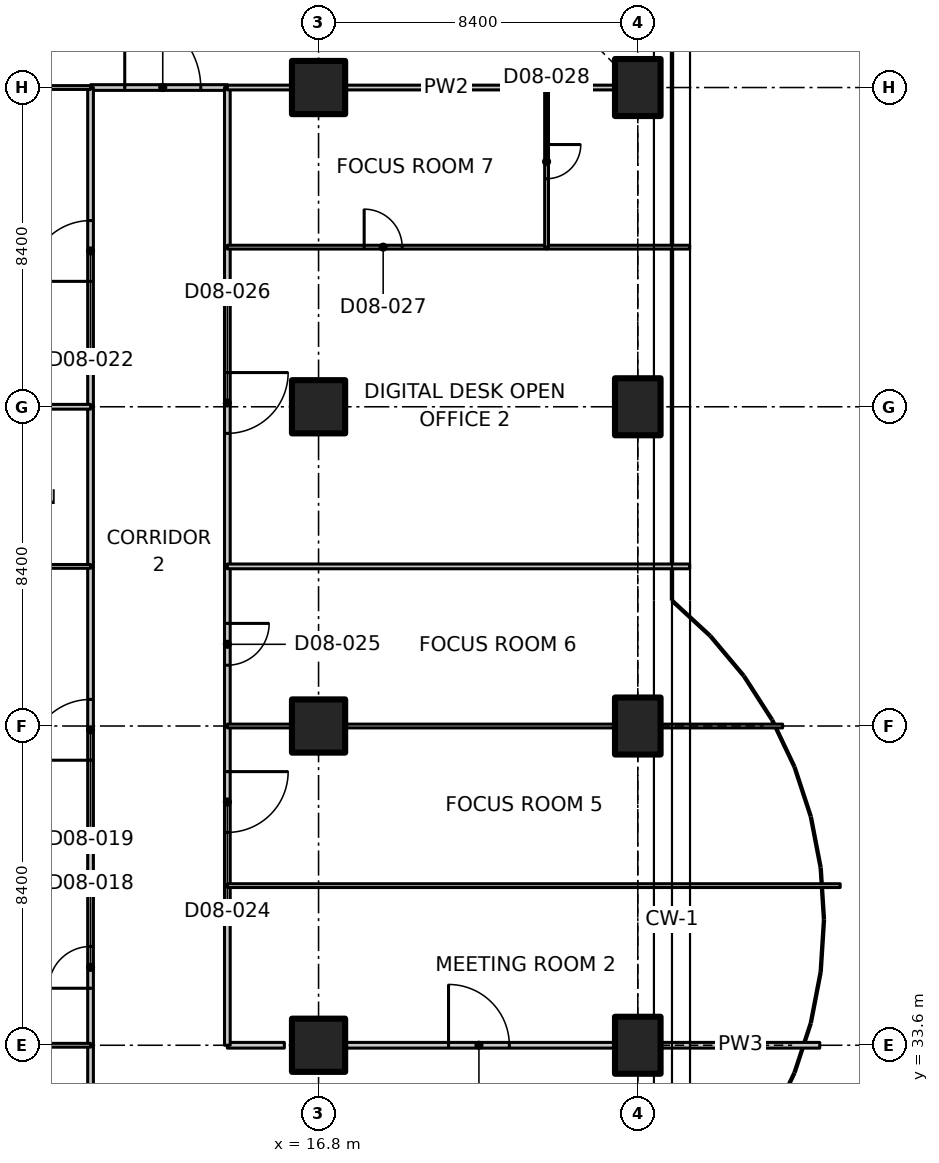
"""IFC4 building model, lengths in metres.
Left out: names, types, materials, properties, quantities, classifications, styles, units other than length and angle.
Written with IfcOpenShell. Run it as: python <this file> out.ifc"""

import sys

from ifc_helpers import new_model, si_unit, direction, frame, frame_2d, origin, origin_2d, place, context, subcontext, project, spatial, polyline, rectangle, outline, extrude, element, fill, save


model = new_model("IFC4")
c1 = context("Model", 3, precision=1e-05, world=origin(), true_north=direction((0.0, 1.0)))
c2 = subcontext(c1, "Body", "Model", "MODEL_VIEW")
j1 = project(units=[si_unit("LENGTHUNIT", "METRE"), si_unit("PLANEANGLEUNIT", "RADIAN")], contexts=[c1])
p1 = place(None, origin())
s1 = spatial("IfcSite", under=j1, at=p1, CompositionType="ELEMENT")
p2 = place(p1, origin())
s2 = spatial("IfcBuilding", under=s1, at=p2, CompositionType="ELEMENT")
p3 = place(p2, frame((0.0, 0.0, 47.3)))
s3 = spatial("IfcBuildingStorey", under=s2, at=p3, CompositionType="ELEMENT", Elevation=47.3)
for number, where, z_axis, x_axis in (
    (1, (16.8, 33.6, 0.0), (0.0, 0.0, 1.0), (1.0, 0.0, 0.0)),
    (2, (16.8, 42.0, 0.0), (0.0, 0.0, 1.0), (1.0, 0.0, 0.0)),
    (3, (16.8, 50.4, 0.0), (0.0, 0.0, 1.0), (1.0, 0.0, 0.0)),
    (4, (16.8, 58.8, 0.0), (0.0, 0.0, 1.0), (1.0, 0.0, 0.0)),
):
    element("IfcColumn", number, at=place(p3, frame(where, z_axis=z_axis, x_axis=x_axis)), inside=s3, PredefinedType="COLUMN", context=c2, shape_type="SweptSolid", body=[
        extrude(rectangle(XDim=1.4, YDim=1.4, at=origin_2d()), origin(), (0.0, 0.0, 1.0), 3.35),
    ])
for number, where, z_axis, x_axis in (
    (5, (25.2, 33.6, 0.0), (0.0, 0.0, 1.0), (1.0, 0.0, 0.0)),
    (6, (25.2, 42.0, 0.0), (0.0, 0.0, 1.0), (1.0, 0.0, 0.0)),
    (7, (25.2, 50.4, 0.0), (0.0, 0.0, 1.0), (1.0, 0.0, 0.0)),
    (8, (25.2, 58.8, 0.0), (0.0, 0.0, 1.0), (1.0, 0.0, 0.0)),
):
    element("IfcColumn", number, at=place(p3, frame(where, z_axis=z_axis, x_axis=x_axis)), inside=s3, PredefinedType="COLUMN", context=c2, shape_type="SweptSolid", body=[
        extrude(rectangle(XDim=1.2, YDim=1.5, at=origin_2d()), origin(), (0.0, 0.0, 1.0), 3.35),
    ])
p4 = place(p3, frame((10.8, 29.4, 0.0), z_axis=(0.0, 0.0, 1.0), x_axis=(0.0, 1.0, 0.0)))
e9 = element("IfcWall", 9, at=p4, inside=s3, PredefinedType="PARTITIONING", context=c2, shape_type="SweptSolid", body=[
    extrude(rectangle(XDim=4.2, YDim=0.15, at=frame_2d((2.1, 0.0))), origin(), (0.0, 0.0, 1.0), 3.33),
])
p5 = place(p4, frame((1.5, 0.0, 0.0)))
e10 = element("IfcOpeningElement", 10, at=p5, cuts=e9, PredefinedType="OPENING", context=c2, shape_type="SweptSolid", body=[
    extrude(rectangle(XDim=1.1, YDim=2.1, at=frame_2d((0.55, 1.05))), frame((0.0, 0.085, 0.0), z_axis=(0.0, -1.0, 0.0), x_axis=(1.0, 0.0, 0.0)), (0.0, 0.0, 1.0), 0.17),
])
p6 = place(p3, frame((14.4, 33.6, 0.0), z_axis=(0.0, 0.0, 1.0), x_axis=(1.0, 0.0, 0.0)))
e11 = element("IfcWall", 11, at=p6, inside=s3, PredefinedType="PARTITIONING", context=c2, shape_type="SweptSolid", body=[
    extrude(rectangle(XDim=1.5, YDim=0.15, at=frame_2d((0.75, 0.0))), origin(), (0.0, 0.0, 1.0), 3.33),
])
p7 = place(p3, frame((17.52, 33.6, 0.0), z_axis=(0.0, 0.0, 1.0), x_axis=(1.0, 0.0, 0.0)))
e12 = element("IfcWall", 12, at=p7, inside=s3, PredefinedType="PARTITIONING", context=c2, shape_type="SweptSolid", body=[
    extrude(rectangle(XDim=7.06, YDim=0.15, at=frame_2d((3.53, 0.0))), origin(), (0.0, 0.0, 1.0), 3.33),
])
p8 = place(p7, frame((2.7, 0.0, 0.0)))
e13 = element("IfcOpeningElement", 13, at=p8, cuts=e12, PredefinedType="OPENING", context=c2, shape_type="SweptSolid", body=[
    extrude(rectangle(XDim=1.6, YDim=2.1, at=frame_2d((0.8, 1.05))), frame((0.0, 0.085, 0.0), z_axis=(0.0, -1.0, 0.0), x_axis=(1.0, 0.0, 0.0)), (0.0, 0.0, 1.0), 0.17),
])
p9 = place(p3, frame((25.82, 33.6, 0.0), z_axis=(0.0, 0.0, 1.0), x_axis=(1.0, 0.0, 0.0)))
e14 = element("IfcWall", 14, at=p9, inside=s3, PredefinedType="PARTITIONING", context=c2, shape_type="SweptSolid", body=[
    extrude(rectangle(XDim=4.168, YDim=0.15, at=frame_2d((2.084, 0.0))), origin(), (0.0, 0.0, 1.0), 2.98),
])
p10 = place(p3, frame((10.8, 58.8, 0.0), z_axis=(0.0, 0.0, 1.0), x_axis=(1.0, 0.0, 0.0)))
e15 = element("IfcWall", 15, at=p10, inside=s3, PredefinedType="PARTITIONING", context=c2, shape_type="SweptSolid", body=[
    extrude(rectangle(XDim=3.6, YDim=0.15, at=frame_2d((1.8, 0.0))), origin(), (0.0, 0.0, 1.0), 3.33),
])
p11 = place(p10, frame((0.9, 0.0, 0.0)))
e16 = element("IfcOpeningElement", 16, at=p11, cuts=e15, PredefinedType="OPENING", context=c2, shape_type="SweptSolid", body=[
    extrude(rectangle(XDim=2.0, YDim=2.4, at=frame_2d((1.0, 1.2))), frame((0.0, 0.085, 0.0), z_axis=(0.0, -1.0, 0.0), x_axis=(1.0, 0.0, 0.0)), (0.0, 0.0, 1.0), 0.17),
])
p12 = place(p3, frame((10.8, 33.6, 0.0), z_axis=(0.0, 0.0, 1.0), x_axis=(0.0, 1.0, 0.0)))
e17 = element("IfcWall", 17, at=p12, inside=s3, PredefinedType="PARTITIONING", context=c2, shape_type="SweptSolid", body=[
    extrude(rectangle(XDim=4.2, YDim=0.15, at=frame_2d((2.1, 0.0))), origin(), (0.0, 0.0, 1.0), 3.33),
])
p13 = place(p12, frame((1.5, 0.0, 0.0)))
e18 = element("IfcOpeningElement", 18, at=p13, cuts=e17, PredefinedType="OPENING", context=c2, shape_type="SweptSolid", body=[
    extrude(rectangle(XDim=1.1, YDim=2.1, at=frame_2d((0.55, 1.05))), frame((0.0, 0.085, 0.0), z_axis=(0.0, -1.0, 0.0), x_axis=(1.0, 0.0, 0.0)), (0.0, 0.0, 1.0), 0.17),
])
p14 = place(p3, frame((10.8, 37.8, 0.0), z_axis=(0.0, 0.0, 1.0), x_axis=(0.0, 1.0, 0.0)))
e19 = element("IfcWall", 19, at=p14, inside=s3, PredefinedType="PARTITIONING", context=c2, shape_type="SweptSolid", body=[
    extrude(rectangle(XDim=8.4, YDim=0.15, at=frame_2d((4.2, 0.0))), origin(), (0.0, 0.0, 1.0), 3.33),
])
p15 = place(p14, frame((3.3, 0.0, 0.0)))
e20 = element("IfcOpeningElement", 20, at=p15, cuts=e19, PredefinedType="OPENING", context=c2, shape_type="SweptSolid", body=[
    extrude(rectangle(XDim=1.6, YDim=2.1, at=frame_2d((0.8, 1.05))), frame((0.0, 0.085, 0.0), z_axis=(0.0, -1.0, 0.0), x_axis=(1.0, 0.0, 0.0)), (0.0, 0.0, 1.0), 0.17),
])
p16 = place(p3, frame((10.8, 46.2, 0.0), z_axis=(0.0, 0.0, 1.0), x_axis=(0.0, 1.0, 0.0)))
e21 = element("IfcWall", 21, at=p16, inside=s3, PredefinedType="PARTITIONING", context=c2, shape_type="SweptSolid", body=[
    extrude(rectangle(XDim=4.2, YDim=0.15, at=frame_2d((2.1, 0.0))), origin(), (0.0, 0.0, 1.0), 3.33),
])
p17 = place(p3, frame((10.8, 50.4, 0.0), z_axis=(0.0, 0.0, 1.0), x_axis=(0.0, 1.0, 0.0)))
e22 = element("IfcWall", 22, at=p17, inside=s3, PredefinedType="PARTITIONING", context=c2, shape_type="SweptSolid", body=[
    extrude(rectangle(XDim=8.4, YDim=0.15, at=frame_2d((4.2, 0.0))), origin(), (0.0, 0.0, 1.0), 3.33),
])
p18 = place(p17, frame((3.3, 0.0, 0.0)))
e23 = element("IfcOpeningElement", 23, at=p18, cuts=e22, PredefinedType="OPENING", context=c2, shape_type="SweptSolid", body=[
    extrude(rectangle(XDim=1.6, YDim=2.1, at=frame_2d((0.8, 1.05))), frame((0.0, 0.085, 0.0), z_axis=(0.0, -1.0, 0.0), x_axis=(1.0, 0.0, 0.0)), (0.0, 0.0, 1.0), 0.17),
])
p19 = place(p3, frame((14.4, 37.8, 0.0), z_axis=(0.0, 0.0, 1.0), x_axis=(0.0, -1.0, 0.0)))
e24 = element("IfcWall", 24, at=p19, inside=s3, PredefinedType="PARTITIONING", context=c2, shape_type="SweptSolid", body=[
    extrude(rectangle(XDim=4.2, YDim=0.15, at=frame_2d((2.1, 0.0))), origin(), (0.0, 0.0, 1.0), 3.33),
])
p20 = place(p3, frame((14.4, 42.0, 0.0), z_axis=(0.0, 0.0, 1.0), x_axis=(0.0, -1.0, 0.0)))
e25 = element("IfcWall", 25, at=p20, inside=s3, PredefinedType="PARTITIONING", context=c2, shape_type="SweptSolid", body=[
    extrude(rectangle(XDim=4.2, YDim=0.15, at=frame_2d((2.1, 0.0))), origin(), (0.0, 0.0, 1.0), 3.33),
])
p21 = place(p20, frame((1.2, 0.0, 0.0)))
e26 = element("IfcOpeningElement", 26, at=p21, cuts=e25, PredefinedType="OPENING", context=c2, shape_type="SweptSolid", body=[
    extrude(rectangle(XDim=1.6, YDim=2.1, at=frame_2d((0.8, 1.05))), frame((0.0, 0.085, 0.0), z_axis=(0.0, -1.0, 0.0), x_axis=(1.0, 0.0, 0.0)), (0.0, 0.0, 1.0), 0.17),
])
p22 = place(p3, frame((14.4, 46.2, 0.0), z_axis=(0.0, 0.0, 1.0), x_axis=(0.0, -1.0, 0.0)))
e27 = element("IfcWall", 27, at=p22, inside=s3, PredefinedType="PARTITIONING", context=c2, shape_type="SweptSolid", body=[
    extrude(rectangle(XDim=4.2, YDim=0.15, at=frame_2d((2.1, 0.0))), origin(), (0.0, 0.0, 1.0), 3.33),
])
p23 = place(p22, frame((1.5, 0.0, 0.0)))
e28 = element("IfcOpeningElement", 28, at=p23, cuts=e27, PredefinedType="OPENING", context=c2, shape_type="SweptSolid", body=[
    extrude(rectangle(XDim=1.1, YDim=2.1, at=frame_2d((0.55, 1.05))), frame((0.0, 0.085, 0.0), z_axis=(0.0, -1.0, 0.0), x_axis=(1.0, 0.0, 0.0)), (0.0, 0.0, 1.0), 0.17),
])
p24 = place(p3, frame((14.4, 54.6, 0.0), z_axis=(0.0, 0.0, 1.0), x_axis=(0.0, -1.0, 0.0)))
e29 = element("IfcWall", 29, at=p24, inside=s3, PredefinedType="PARTITIONING", context=c2, shape_type="SweptSolid", body=[
    extrude(rectangle(XDim=8.4, YDim=0.15, at=frame_2d((4.2, 0.0))), origin(), (0.0, 0.0, 1.0), 3.33),
])
p25 = place(p24, frame((3.3, 0.0, 0.0)))
e30 = element("IfcOpeningElement", 30, at=p25, cuts=e29, PredefinedType="OPENING", context=c2, shape_type="SweptSolid", body=[
    extrude(rectangle(XDim=1.6, YDim=2.1, at=frame_2d((0.8, 1.05))), frame((0.0, 0.085, 0.0), z_axis=(0.0, -1.0, 0.0), x_axis=(1.0, 0.0, 0.0)), (0.0, 0.0, 1.0), 0.17),
])
p26 = place(p3, frame((14.4, 58.8, 0.0), z_axis=(0.0, 0.0, 1.0), x_axis=(0.0, -1.0, 0.0)))
e31 = element("IfcWall", 31, at=p26, inside=s3, PredefinedType="PARTITIONING", context=c2, shape_type="SweptSolid", body=[
    extrude(rectangle(XDim=4.2, YDim=0.15, at=frame_2d((2.1, 0.0))), origin(), (0.0, 0.0, 1.0), 3.33),
])
p27 = place(p3, frame((10.8, 58.8, 0.0), z_axis=(0.0, 0.0, 1.0), x_axis=(-1.0, 0.0, 0.0)))
e32 = element("IfcWall", 32, at=p27, inside=s3, PredefinedType="PARTITIONING", context=c2, shape_type="SweptSolid", body=[
    extrude(rectangle(XDim=1.68, YDim=0.1, at=frame_2d((0.84, 0.0))), origin(), (0.0, 0.0, 1.0), 3.33),
])
p28 = place(p3, frame((22.8, 58.8, 0.0), z_axis=(0.0, 0.0, 1.0), x_axis=(-1.0, 0.0, 0.0)))
e33 = element("IfcWall", 33, at=p28, inside=s3, PredefinedType="PARTITIONING", context=c2, shape_type="SweptSolid", body=[
    extrude(rectangle(XDim=5.28, YDim=0.125, at=frame_2d((2.64, 0.0))), origin(), (0.0, 0.0, 1.0), 3.33),
])
p29 = place(p3, frame((16.08, 58.8, 0.0), z_axis=(0.0, 0.0, 1.0), x_axis=(-1.0, 0.0, 0.0)))
e34 = element("IfcWall", 34, at=p29, inside=s3, PredefinedType="PARTITIONING", context=c2, shape_type="SweptSolid", body=[
    extrude(rectangle(XDim=1.68, YDim=0.125, at=frame_2d((0.84, 0.0))), origin(), (0.0, 0.0, 1.0), 3.33),
])
p30 = place(p3, frame((24.58, 58.8, 0.0), z_axis=(0.0, 0.0, 1.0), x_axis=(-1.0, 0.0, 0.0)))
e35 = element("IfcWall", 35, at=p30, inside=s3, PredefinedType="PARTITIONING", context=c2, shape_type="SweptSolid", body=[
    extrude(rectangle(XDim=1.78, YDim=0.125, at=frame_2d((0.89, 0.0))), origin(), (0.0, 0.0, 1.0), 3.33),
])
p31 = place(p3, frame((9.12, 33.6, 0.0), z_axis=(0.0, 0.0, 1.0), x_axis=(1.0, 0.0, 0.0)))
e36 = element("IfcWall", 36, at=p31, inside=s3, PredefinedType="PARTITIONING", context=c2, shape_type="SweptSolid", body=[
    extrude(rectangle(XDim=1.68, YDim=0.1, at=frame_2d((0.84, 0.0))), origin(), (0.0, 0.0, 1.0), 3.33),
])
p32 = place(p3, frame((-1.365, 37.8, 0.0), z_axis=(0.0, 0.0, 1.0), x_axis=(1.0, 0.0, 0.0)))
e37 = element("IfcWall", 37, at=p32, inside=s3, PredefinedType="PARTITIONING", context=c2, shape_type="SweptSolid", body=[
    extrude(outline(polyline([(0.0, 0.0), (12.165, 0.0), (12.165, 3.33), (1.815, 3.33), (1.813, 2.98), (0.917, 2.98), (0.915, 3.33), (0.265, 3.33), (0.0, 3.33), (0.0, 0.0)])), frame((0.0, 0.062, 0.0), z_axis=(0.0, -1.0, 0.0), x_axis=(1.0, 0.0, 0.0)), (0.0, 0.0, 1.0), 0.125),
])
p33 = place(p3, frame((6.0, 46.2, 0.0), z_axis=(0.0, 0.0, 1.0), x_axis=(1.0, 0.0, 0.0)))
e38 = element("IfcWall", 38, at=p33, inside=s3, PredefinedType="PARTITIONING", context=c2, shape_type="SweptSolid", body=[
    extrude(rectangle(XDim=4.8, YDim=0.1, at=frame_2d((2.4, 0.0))), origin(), (0.0, 0.0, 1.0), 3.33),
])
p34 = place(p33, frame((1.8, 0.0, 0.0)))
e39 = element("IfcOpeningElement", 39, at=p34, cuts=e38, PredefinedType="OPENING", context=c2, shape_type="SweptSolid", body=[
    extrude(rectangle(XDim=1.0, YDim=2.1, at=frame_2d((0.5, 1.05))), frame((0.0, 0.06, 0.0), z_axis=(0.0, -1.0, 0.0), x_axis=(1.0, 0.0, 0.0)), (0.0, 0.0, 1.0), 0.12),
])
p35 = place(p3, frame((9.12, 50.4, 0.0), z_axis=(0.0, 0.0, 1.0), x_axis=(1.0, 0.0, 0.0)))
e40 = element("IfcWall", 40, at=p35, inside=s3, PredefinedType="PARTITIONING", context=c2, shape_type="SweptSolid", body=[
    extrude(rectangle(XDim=1.68, YDim=0.125, at=frame_2d((0.84, 0.0))), origin(), (0.0, 0.0, 1.0), 3.33),
])
p36 = place(p3, frame((14.4, 37.8, 0.0), z_axis=(0.0, 0.0, 1.0), x_axis=(1.0, 0.0, 0.0)))
e41 = element("IfcWall", 41, at=p36, inside=s3, PredefinedType="PARTITIONING", context=c2, shape_type="SweptSolid", body=[
    extrude(outline(polyline([(0.0, 0.0), (16.126, 0.0), (16.126, 3.33), (15.843, 3.33), (11.25, 3.33), (11.248, 2.98), (10.352, 2.98), (10.35, 3.33), (0.0, 3.33), (0.0, 0.0)])), frame((0.0, 0.05, 0.0), z_axis=(0.0, -1.0, 0.0), x_axis=(1.0, 0.0, 0.0)), (0.0, 0.0, 1.0), 0.1),
])
p37 = place(p3, frame((14.4, 42.0, 0.0), z_axis=(0.0, 0.0, 1.0), x_axis=(1.0, 0.0, 0.0)))
e42 = element("IfcWall", 42, at=p37, inside=s3, PredefinedType="PARTITIONING", context=c2, shape_type="SweptSolid", body=[
    extrude(rectangle(XDim=1.68, YDim=0.1, at=frame_2d((0.84, 0.0))), origin(), (0.0, 0.0, 1.0), 3.33),
])
p38 = place(p3, frame((17.52, 42.0, 0.0), z_axis=(0.0, 0.0, 1.0), x_axis=(1.0, 0.0, 0.0)))
e43 = element("IfcWall", 43, at=p38, inside=s3, PredefinedType="PARTITIONING", context=c2, shape_type="SweptSolid", body=[
    extrude(rectangle(XDim=7.06, YDim=0.1, at=frame_2d((3.53, 0.0))), origin(), (0.0, 0.0, 1.0), 3.33),
])
p39 = place(p3, frame((25.82, 42.0, 0.0), z_axis=(0.0, 0.0, 1.0), x_axis=(1.0, 0.0, 0.0)))
e44 = element("IfcWall", 44, at=p39, inside=s3, PredefinedType="PARTITIONING", context=c2, shape_type="SweptSolid", body=[
    extrude(rectangle(XDim=3.191, YDim=0.1, at=frame_2d((1.596, 0.0))), origin(), (0.0, 0.0, 1.0), 2.98),
])
p40 = place(p3, frame((14.4, 46.2, 0.0), z_axis=(0.0, 0.0, 1.0), x_axis=(1.0, 0.0, 0.0)))
e45 = element("IfcWall", 45, at=p40, inside=s3, PredefinedType="PARTITIONING", context=c2, shape_type="SweptSolid", body=[
    extrude(outline(polyline([(0.0, 0.0), (12.165, 0.0), (12.165, 3.33), (11.9, 3.33), (11.25, 3.33), (11.248, 2.98), (10.352, 2.98), (10.35, 3.33), (0.0, 3.33), (0.0, 0.0)])), frame((0.0, 0.062, 0.0), z_axis=(0.0, -1.0, 0.0), x_axis=(1.0, 0.0, 0.0)), (0.0, 0.0, 1.0), 0.125),
])
p41 = place(p3, frame((14.4, 54.6, 0.0), z_axis=(0.0, 0.0, 1.0), x_axis=(1.0, 0.0, 0.0)))
e46 = element("IfcWall", 46, at=p41, inside=s3, PredefinedType="PARTITIONING", context=c2, shape_type="SweptSolid", body=[
    extrude(rectangle(XDim=8.4, YDim=0.1, at=frame_2d((4.2, 0.0))), origin(), (0.0, 0.0, 1.0), 3.33),
])
p42 = place(p41, frame((3.6, 0.0, 0.0)))
e47 = element("IfcOpeningElement", 47, at=p42, cuts=e46, PredefinedType="OPENING", context=c2, shape_type="SweptSolid", body=[
    extrude(rectangle(XDim=1.0, YDim=2.1, at=frame_2d((0.5, 1.05))), frame((0.0, 0.06, 0.0), z_axis=(0.0, -1.0, 0.0), x_axis=(1.0, 0.0, 0.0)), (0.0, 0.0, 1.0), 0.12),
])
p43 = place(p3, frame((22.8, 54.6, 0.0), z_axis=(0.0, 0.0, 1.0), x_axis=(1.0, 0.0, 0.0)))
e48 = element("IfcWall", 48, at=p43, inside=s3, PredefinedType="PARTITIONING", context=c2, shape_type="SweptSolid", body=[
    extrude(rectangle(XDim=3.765, YDim=0.1, at=frame_2d((1.882, 0.0))), origin(), (0.0, 0.0, 1.0), 2.98),
])
p44 = place(p3, frame((22.8, 58.8, 0.0), z_axis=(0.0, 0.0, 1.0), x_axis=(0.0, -1.0, 0.0)))
e49 = element("IfcWall", 49, at=p44, inside=s3, PredefinedType="PARTITIONING", context=c2, shape_type="SweptSolid", body=[
    extrude(rectangle(XDim=4.2, YDim=0.1, at=frame_2d((2.1, 0.0))), origin(), (0.0, 0.0, 1.0), 3.33),
])
p45 = place(p44, frame((1.5, 0.0, 0.0)))
e50 = element("IfcOpeningElement", 50, at=p45, cuts=e49, PredefinedType="OPENING", context=c2, shape_type="SweptSolid", body=[
    extrude(rectangle(XDim=0.9, YDim=2.1, at=frame_2d((0.45, 1.05))), frame((0.0, 0.06, 0.0), z_axis=(0.0, -1.0, 0.0), x_axis=(1.0, 0.0, 0.0)), (0.0, 0.0, 1.0), 0.12),
])
p46 = place(p11, origin())
e51 = element("IfcDoor", 51, at=p46, inside=s3, OperationType="DOUBLE_DOOR_SINGLE_SWING", PredefinedType="DOOR", context=c2, shape_type="SweptSolid", body=[
    extrude(rectangle(XDim=2.0, YDim=2.4, at=frame_2d((1.0, 1.2))), frame((0.0, 0.025, 0.0), z_axis=(0.0, -1.0, 0.0), x_axis=(1.0, 0.0, 0.0)), (0.0, 0.0, 1.0), 0.05),
])
fill(e16, e51)
p47 = place(p13, origin())
e52 = element("IfcDoor", 52, at=p47, inside=s3, OperationType="SINGLE_SWING_LEFT", PredefinedType="DOOR", context=c2, shape_type="SweptSolid", body=[
    extrude(rectangle(XDim=1.1, YDim=2.1, at=frame_2d((0.55, 1.05))), frame((0.0, 0.025, 0.0), z_axis=(0.0, -1.0, 0.0), x_axis=(1.0, 0.0, 0.0)), (0.0, 0.0, 1.0), 0.05),
])
fill(e18, e52)
p48 = place(p15, origin())
e53 = element("IfcDoor", 53, at=p48, inside=s3, OperationType="DOUBLE_DOOR_SINGLE_SWING", PredefinedType="DOOR", context=c2, shape_type="SweptSolid", body=[
    extrude(rectangle(XDim=1.6, YDim=2.1, at=frame_2d((0.8, 1.05))), frame((0.0, 0.025, 0.0), z_axis=(0.0, -1.0, 0.0), x_axis=(1.0, 0.0, 0.0)), (0.0, 0.0, 1.0), 0.05),
])
fill(e20, e53)
p49 = place(p18, origin())
e54 = element("IfcDoor", 54, at=p49, inside=s3, OperationType="DOUBLE_DOOR_SINGLE_SWING", PredefinedType="DOOR", context=c2, shape_type="SweptSolid", body=[
    extrude(rectangle(XDim=1.6, YDim=2.1, at=frame_2d((0.8, 1.05))), frame((0.0, 0.025, 0.0), z_axis=(0.0, -1.0, 0.0), x_axis=(1.0, 0.0, 0.0)), (0.0, 0.0, 1.0), 0.05),
])
fill(e23, e54)
p50 = place(p8, origin())
e55 = element("IfcDoor", 55, at=p50, inside=s3, OperationType="DOUBLE_DOOR_SINGLE_SWING", PredefinedType="DOOR", context=c2, shape_type="SweptSolid", body=[
    extrude(rectangle(XDim=1.6, YDim=2.1, at=frame_2d((0.8, 1.05))), frame((0.0, 0.025, 0.0), z_axis=(0.0, -1.0, 0.0), x_axis=(1.0, 0.0, 0.0)), (0.0, 0.0, 1.0), 0.05),
])
fill(e13, e55)
p51 = place(p21, origin())
e56 = element("IfcDoor", 56, at=p51, inside=s3, OperationType="DOUBLE_DOOR_SINGLE_SWING", PredefinedType="DOOR", context=c2, shape_type="SweptSolid", body=[
    extrude(rectangle(XDim=1.6, YDim=2.1, at=frame_2d((0.8, 1.05))), frame((0.0, 0.025, 0.0), z_axis=(0.0, -1.0, 0.0), x_axis=(1.0, 0.0, 0.0)), (0.0, 0.0, 1.0), 0.05),
])
fill(e26, e56)
p52 = place(p23, origin())
e57 = element("IfcDoor", 57, at=p52, inside=s3, OperationType="SINGLE_SWING_LEFT", PredefinedType="DOOR", context=c2, shape_type="SweptSolid", body=[
    extrude(rectangle(XDim=1.1, YDim=2.1, at=frame_2d((0.55, 1.05))), frame((0.0, 0.025, 0.0), z_axis=(0.0, -1.0, 0.0), x_axis=(1.0, 0.0, 0.0)), (0.0, 0.0, 1.0), 0.05),
])
fill(e28, e57)
p53 = place(p25, origin())
e58 = element("IfcDoor", 58, at=p53, inside=s3, OperationType="DOUBLE_DOOR_SINGLE_SWING", PredefinedType="DOOR", context=c2, shape_type="SweptSolid", body=[
    extrude(rectangle(XDim=1.6, YDim=2.1, at=frame_2d((0.8, 1.05))), frame((0.0, 0.025, 0.0), z_axis=(0.0, -1.0, 0.0), x_axis=(1.0, 0.0, 0.0)), (0.0, 0.0, 1.0), 0.05),
])
fill(e30, e58)
p54 = place(p42, origin())
e59 = element("IfcDoor", 59, at=p54, inside=s3, OperationType="SINGLE_SWING_LEFT", PredefinedType="DOOR", context=c2, shape_type="SweptSolid", body=[
    extrude(rectangle(XDim=1.0, YDim=2.1, at=frame_2d((0.5, 1.05))), frame((0.0, 0.025, 0.0), z_axis=(0.0, -1.0, 0.0), x_axis=(1.0, 0.0, 0.0)), (0.0, 0.0, 1.0), 0.05),
])
fill(e47, e59)
p55 = place(p45, origin())
e60 = element("IfcDoor", 60, at=p55, inside=s3, OperationType="SINGLE_SWING_LEFT", PredefinedType="DOOR", context=c2, shape_type="SweptSolid", body=[
    extrude(rectangle(XDim=0.9, YDim=2.1, at=frame_2d((0.45, 1.05))), frame((0.0, 0.025, 0.0), z_axis=(0.0, -1.0, 0.0), x_axis=(1.0, 0.0, 0.0)), (0.0, 0.0, 1.0), 0.05),
])
fill(e50, e60)
save(model, sys.argv[1])
